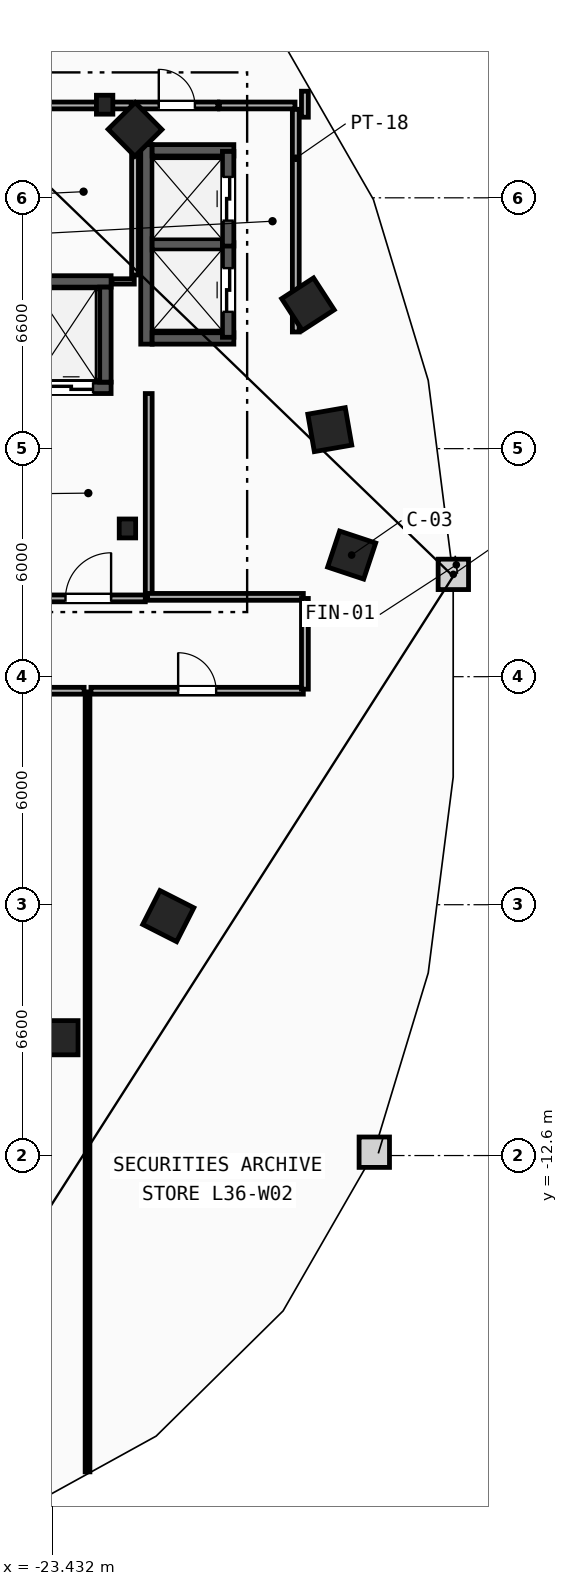
"""IFC4 building model, lengths in metres.
Left out: names, types, materials, properties, quantities, classifications, styles, units other than length and angle.
Written with IfcOpenShell. Run it as: python <this file> out.ifc"""

import sys

from ifc_helpers import new_model, si_unit, direction, frame, frame_2d, origin, origin_2d, place, context, subcontext, project, spatial, rectangle, i_section, extrude, element, fill, save


model = new_model("IFC4")
c1 = context("Model", 3, precision=1e-05, world=origin(), true_north=direction((0.0, 1.0)))
c2 = subcontext(c1, "Body", "Model", "MODEL_VIEW")
j1 = project(units=[si_unit("LENGTHUNIT", "METRE"), si_unit("PLANEANGLEUNIT", "RADIAN")], contexts=[c1])
p1 = place(None, origin())
s1 = spatial("IfcSite", under=j1, at=p1, CompositionType="ELEMENT")
p2 = place(p1, origin())
s2 = spatial("IfcBuilding", under=s1, at=p2, CompositionType="ELEMENT")
p3 = place(p2, frame((0.0, 0.0, 140.4)))
s3 = spatial("IfcBuildingStorey", under=s2, at=p3, CompositionType="ELEMENT", Elevation=140.4)
for number, where, z_axis, x_axis in (
    (1, (-21.45, 3.9, 0.0), (0.0, 0.0, 1.0), (1.0, 0.0, 0.0)),
    (2, (-22.05, 15.05, 0.0), (0.0, 0.0, 1.0), (1.0, 0.0, 0.0)),
):
    element("IfcColumn", number, at=place(p3, frame(where, z_axis=z_axis, x_axis=x_axis)), inside=s3, PredefinedType="COLUMN", context=c2, shape_type="SweptSolid", body=[
        extrude(i_section(OverallWidth=0.432, OverallDepth=0.498, WebThickness=0.056, FlangeThickness=0.089, FilletRadius=0.018, at=origin_2d()), origin(), (0.0, 0.0, 1.0), 3.6),
    ])
p4 = place(p3, frame((-23.2, -9.5, 0.0), z_axis=(0.0, 0.0, 1.0), x_axis=(1.0, 0.0, 0.0)))
e3 = element("IfcColumn", 3, at=p4, inside=s3, PredefinedType="COLUMN", context=c2, shape_type="SweptSolid", body=[
    extrude(rectangle(XDim=0.9, YDim=0.9, at=origin_2d()), origin(), (0.0, 0.0, 1.0), 3.6),
])
for number, where, z_axis, x_axis in (
    (4, (-15.55, 3.2, 0.0), (0.0, 0.0, 1.0), (0.315, 0.949, 0.0)),
    (5, (-16.125, 6.5, 0.0), (0.0, 0.0, 1.0), (-0.172, 0.985, 0.0)),
    (6, (-16.7, 9.8, 0.0), (0.0, 0.0, 1.0), (-0.544, 0.839, 0.0)),
    (7, (-21.25, 14.4, 0.0), (0.0, 0.0, 1.0), (-0.703, 0.711, 0.0)),
    (8, (-20.375, -6.3, 0.0), (0.0, 0.0, 1.0), (0.453, 0.892, 0.0)),
):
    element("IfcColumn", number, at=place(p3, frame(where, z_axis=z_axis, x_axis=x_axis)), inside=s3, PredefinedType="COLUMN", context=c2, shape_type="SweptSolid", body=[
        extrude(rectangle(XDim=1.0, YDim=1.0, at=origin_2d()), origin(), (0.0, 0.0, 1.0), 3.6),
    ])
p5 = place(p3, frame((-20.89, 2.15, 0.0), z_axis=(0.0, 0.0, 1.0), x_axis=(0.0, 1.0, 0.0)))
e9 = element("IfcWall", 9, at=p5, inside=s3, PredefinedType="PARTITIONING", context=c2, shape_type="SweptSolid", body=[
    extrude(rectangle(XDim=5.3, YDim=0.18, at=frame_2d((2.65, 0.0))), origin(), (0.0, 0.0, 1.0), 3.36),
])
p6 = place(p3, frame((-23.98, 2.06, 0.0), z_axis=(0.0, 0.0, 1.0), x_axis=(1.0, 0.0, 0.0)))
e10 = element("IfcWall", 10, at=p6, inside=s3, PredefinedType="PARTITIONING", context=c2, shape_type="SweptSolid", body=[
    extrude(rectangle(XDim=3.0, YDim=0.18, at=frame_2d((1.5, 0.0))), origin(), (0.0, 0.0, 1.0), 3.36),
])
p7 = place(p6, frame((0.9, 0.0, 0.0)))
e11 = element("IfcOpeningElement", 11, at=p7, cuts=e10, PredefinedType="OPENING", context=c2, shape_type="SweptSolid", body=[
    extrude(rectangle(XDim=1.2, YDim=2.15, at=frame_2d((0.6, 1.075))), frame((0.0, 0.1, 0.0), z_axis=(0.0, -1.0, 0.0), x_axis=(1.0, 0.0, 0.0)), (0.0, 0.0, 1.0), 0.2),
])
p8 = place(p3, frame((-23.98, 7.6, 0.0), z_axis=(0.0, 0.0, 1.0), x_axis=(1.0, 0.0, 0.0)))
e12 = element("IfcWall", 12, at=p8, inside=s3, PredefinedType="SHEAR", context=c2, shape_type="SweptSolid", body=[
    extrude(rectangle(XDim=2.1, YDim=0.3, at=frame_2d((1.05, 0.0))), origin(), (0.0, 0.0, 1.0), 3.36),
])
p9 = place(p8, frame((0.475, 0.0, 0.0)))
e13 = element("IfcOpeningElement", 13, at=p9, cuts=e12, PredefinedType="OPENING", context=c2, shape_type="SweptSolid", body=[
    extrude(rectangle(XDim=1.15, YDim=2.2, at=frame_2d((0.575, 1.1))), frame((0.0, 0.16, 0.0), z_axis=(0.0, -1.0, 0.0), x_axis=(1.0, 0.0, 0.0)), (0.0, 0.0, 1.0), 0.32),
])
p10 = place(p3, frame((-23.98, 10.4, 0.0), z_axis=(0.0, 0.0, 1.0), x_axis=(1.0, 0.0, 0.0)))
e14 = element("IfcWall", 14, at=p10, inside=s3, PredefinedType="SHEAR", context=c2, shape_type="SweptSolid", body=[
    extrude(rectangle(XDim=2.1, YDim=0.3, at=frame_2d((1.05, 0.0))), origin(), (0.0, 0.0, 1.0), 3.36),
])
p11 = place(p3, frame((-22.03, 7.75, 0.0), z_axis=(0.0, 0.0, 1.0), x_axis=(0.0, 1.0, 0.0)))
e15 = element("IfcWall", 15, at=p11, inside=s3, PredefinedType="SHEAR", context=c2, shape_type="SweptSolid", body=[
    extrude(rectangle(XDim=2.5, YDim=0.3, at=frame_2d((1.25, 0.0))), origin(), (0.0, 0.0, 1.0), 3.36),
])
p12 = place(p3, frame((-20.95, 8.75, 0.0), z_axis=(0.0, 0.0, 1.0), x_axis=(0.0, 1.0, 0.0)))
e16 = element("IfcWall", 16, at=p12, inside=s3, PredefinedType="SHEAR", context=c2, shape_type="SweptSolid", body=[
    extrude(rectangle(XDim=5.25, YDim=0.3, at=frame_2d((2.625, 0.0))), origin(), (0.0, 0.0, 1.0), 3.36),
])
for number, where, z_axis, x_axis in (
    (17, (-20.8, 8.9, 0.0), (0.0, 0.0, 1.0), (1.0, 0.0, 0.0)),
    (18, (-20.8, 13.85, 0.0), (0.0, 0.0, 1.0), (1.0, 0.0, 0.0)),
):
    element("IfcWall", number, at=place(p3, frame(where, z_axis=z_axis, x_axis=x_axis)), inside=s3, PredefinedType="SHEAR", context=c2, shape_type="SweptSolid", body=[
        extrude(rectangle(XDim=2.15, YDim=0.3, at=frame_2d((1.075, 0.0))), origin(), (0.0, 0.0, 1.0), 3.36),
    ])
p13 = place(p3, frame((-20.8, 11.375, 0.0), z_axis=(0.0, 0.0, 1.0), x_axis=(1.0, 0.0, 0.0)))
e19 = element("IfcWall", 19, at=p13, inside=s3, PredefinedType="SHEAR", context=c2, shape_type="SweptSolid", body=[
    extrude(rectangle(XDim=1.85, YDim=0.3, at=frame_2d((0.925, 0.0))), origin(), (0.0, 0.0, 1.0), 3.36),
])
p14 = place(p3, frame((-18.8, 8.93, 0.0), z_axis=(0.0, 0.0, 1.0), x_axis=(0.0, 1.0, 0.0)))
e20 = element("IfcWall", 20, at=p14, inside=s3, PredefinedType="SHEAR", context=c2, shape_type="SweptSolid", body=[
    extrude(rectangle(XDim=2.49, YDim=0.3, at=frame_2d((1.245, 0.0))), origin(), (0.0, 0.0, 1.0), 3.36),
])
p15 = place(p14, frame((0.67, 0.0, 0.0)))
e21 = element("IfcOpeningElement", 21, at=p15, cuts=e20, PredefinedType="OPENING", context=c2, shape_type="SweptSolid", body=[
    extrude(rectangle(XDim=1.15, YDim=2.2, at=frame_2d((0.575, 1.1))), frame((0.0, 0.16, 0.0), z_axis=(0.0, -1.0, 0.0), x_axis=(1.0, 0.0, 0.0)), (0.0, 0.0, 1.0), 0.32),
])
p16 = place(p3, frame((-18.8, 11.33, 0.0), z_axis=(0.0, 0.0, 1.0), x_axis=(0.0, 1.0, 0.0)))
e22 = element("IfcWall", 22, at=p16, inside=s3, PredefinedType="SHEAR", context=c2, shape_type="SweptSolid", body=[
    extrude(rectangle(XDim=2.49, YDim=0.3, at=frame_2d((1.245, 0.0))), origin(), (0.0, 0.0, 1.0), 3.36),
])
p17 = place(p16, frame((0.67, 0.0, 0.0)))
e23 = element("IfcOpeningElement", 23, at=p17, cuts=e22, PredefinedType="OPENING", context=c2, shape_type="SweptSolid", body=[
    extrude(rectangle(XDim=1.15, YDim=2.2, at=frame_2d((0.575, 1.1))), frame((0.0, 0.16, 0.0), z_axis=(0.0, -1.0, 0.0), x_axis=(1.0, 0.0, 0.0)), (0.0, 0.0, 1.0), 0.32),
])
p18 = place(p3, frame((-17.02, 9.07, 0.0), z_axis=(0.0, 0.0, 1.0), x_axis=(0.0, 1.0, 0.0)))
e24 = element("IfcWall", 24, at=p18, inside=s3, PredefinedType="PARTITIONING", context=c2, shape_type="SweptSolid", body=[
    extrude(rectangle(XDim=5.86, YDim=0.18, at=frame_2d((2.93, 0.0))), origin(), (0.0, 0.0, 1.0), 3.36),
])
p19 = place(p3, frame((-21.23, 15.03, 0.0), z_axis=(0.0, 0.0, 1.0), x_axis=(1.0, 0.0, 0.0)))
e25 = element("IfcWall", 25, at=p19, inside=s3, PredefinedType="PARTITIONING", context=c2, shape_type="SweptSolid", body=[
    extrude(rectangle(XDim=2.16, YDim=0.18, at=frame_2d((1.08, 0.0))), origin(), (0.0, 0.0, 1.0), 3.36),
])
p20 = place(p19, frame((0.605, 0.0, 0.0)))
e26 = element("IfcOpeningElement", 26, at=p20, cuts=e25, PredefinedType="OPENING", context=c2, shape_type="SweptSolid", body=[
    extrude(rectangle(XDim=0.95, YDim=2.1, at=frame_2d((0.475, 1.05))), frame((0.0, 0.1, 0.0), z_axis=(0.0, -1.0, 0.0), x_axis=(1.0, 0.0, 0.0)), (0.0, 0.0, 1.0), 0.2),
])
p21 = place(p3, frame((-19.03, 15.03, 0.0), z_axis=(0.0, 0.0, 1.0), x_axis=(1.0, 0.0, 0.0)))
e27 = element("IfcWall", 27, at=p21, inside=s3, PredefinedType="PARTITIONING", context=c2, shape_type="SweptSolid", body=[
    extrude(rectangle(XDim=1.99, YDim=0.18, at=frame_2d((0.995, 0.0))), origin(), (0.0, 0.0, 1.0), 3.36),
])
p22 = place(p3, frame((-21.86, 10.4, 0.0), z_axis=(0.0, 0.0, 1.0), x_axis=(1.0, 0.0, 0.0)))
e28 = element("IfcWall", 28, at=p22, inside=s3, PredefinedType="PARTITIONING", context=c2, shape_type="SweptSolid", body=[
    extrude(rectangle(XDim=0.59, YDim=0.14, at=frame_2d((0.295, 0.0))), origin(), (0.0, 0.0, 1.0), 3.36),
])
p23 = place(p3, frame((-21.25, 10.57, 0.0), z_axis=(0.0, 0.0, 1.0), x_axis=(0.0, 1.0, 0.0)))
e29 = element("IfcWall", 29, at=p23, inside=s3, PredefinedType="PARTITIONING", context=c2, shape_type="SweptSolid", body=[
    extrude(rectangle(XDim=4.36, YDim=0.18, at=frame_2d((2.18, 0.0))), origin(), (0.0, 0.0, 1.0), 3.36),
])
p24 = place(p3, frame((-23.96, 15.03, 0.0), z_axis=(0.0, 0.0, 1.0), x_axis=(1.0, 0.0, 0.0)))
e30 = element("IfcWall", 30, at=p24, inside=s3, PredefinedType="PARTITIONING", context=c2, shape_type="SweptSolid", body=[
    extrude(rectangle(XDim=2.61, YDim=0.18, at=frame_2d((1.305, 0.0))), origin(), (0.0, 0.0, 1.0), 2.433),
])
p25 = place(p3, frame((-22.5, -20.923, 0.0), z_axis=(0.0, 0.0, 1.0), x_axis=(0.0, 1.0, 0.0)))
e31 = element("IfcWall", 31, at=p25, inside=s3, PredefinedType="PARTITIONING", context=c2, shape_type="SweptSolid", body=[
    extrude(rectangle(XDim=20.523, YDim=0.125, at=frame_2d((10.262, 0.0))), origin(), (0.0, 0.0, 1.0), 2.665),
])
p26 = place(p3, frame((-25.4, -0.37, 0.0), z_axis=(0.0, 0.0, 1.0), x_axis=(1.0, 0.0, 0.0)))
e32 = element("IfcWall", 32, at=p26, inside=s3, PredefinedType="PARTITIONING", context=c2, shape_type="SweptSolid", body=[
    extrude(rectangle(XDim=2.81, YDim=0.18, at=frame_2d((1.405, 0.0))), origin(), (0.0, 0.0, 1.0), 3.36),
])
p27 = place(p3, frame((-22.41, -0.37, 0.0), z_axis=(0.0, 0.0, 1.0), x_axis=(1.0, 0.0, 0.0)))
e33 = element("IfcWall", 33, at=p27, inside=s3, PredefinedType="PARTITIONING", context=c2, shape_type="SweptSolid", body=[
    extrude(rectangle(XDim=5.588, YDim=0.18, at=frame_2d((2.794, 0.0))), origin(), (0.0, 0.0, 1.0), 3.36),
])
p28 = place(p27, frame((2.294, 0.0, 0.0)))
e34 = element("IfcOpeningElement", 34, at=p28, cuts=e33, PredefinedType="OPENING", context=c2, shape_type="SweptSolid", body=[
    extrude(rectangle(XDim=1.0, YDim=2.15, at=frame_2d((0.5, 1.075))), frame((0.0, 0.1, 0.0), z_axis=(0.0, -1.0, 0.0), x_axis=(1.0, 0.0, 0.0)), (0.0, 0.0, 1.0), 0.2),
])
p29 = place(p3, frame((-16.822, 2.1, 0.0), z_axis=(0.0, 0.0, 1.0), x_axis=(-1.0, 0.0, 0.0)))
e35 = element("IfcWall", 35, at=p29, inside=s3, PredefinedType="PARTITIONING", context=c2, shape_type="SweptSolid", body=[
    extrude(rectangle(XDim=4.098, YDim=0.18, at=frame_2d((2.049, 0.0))), origin(), (0.0, 0.0, 1.0), 3.36),
])
p30 = place(p3, frame((-16.78, -0.329, 0.0), z_axis=(0.0, 0.0, 1.0), x_axis=(0.0, 1.0, 0.0)))
e36 = element("IfcWall", 36, at=p30, inside=s3, PredefinedType="PARTITIONING", context=c2, shape_type="SweptSolid", body=[
    extrude(rectangle(XDim=2.387, YDim=0.18, at=frame_2d((1.194, 0.0))), origin(), (0.0, 0.0, 1.0), 3.36),
])
p31 = place(p3, frame((-16.78, 14.721, 0.0), z_axis=(0.0, 0.0, 1.0), x_axis=(0.0, 1.0, 0.0)))
e37 = element("IfcWall", 37, at=p31, inside=s3, PredefinedType="PARTITIONING", context=c2, shape_type="SweptSolid", body=[
    extrude(rectangle(XDim=0.684, YDim=0.18, at=frame_2d((0.342, 0.0))), origin(), (0.0, 0.0, 1.0), 3.36),
])
p32 = place(p7, origin())
e38 = element("IfcDoor", 38, at=p32, inside=s3, OperationType="SINGLE_SWING_RIGHT", PredefinedType="DOOR", context=c2, shape_type="SweptSolid", body=[
    extrude(rectangle(XDim=1.2, YDim=2.15, at=frame_2d((0.6, 1.075))), frame((0.0, 0.025, 0.0), z_axis=(0.0, -1.0, 0.0), x_axis=(1.0, 0.0, 0.0)), (0.0, 0.0, 1.0), 0.05),
])
fill(e11, e38)
p33 = place(p9, origin())
e39 = element("IfcDoor", 39, at=p33, inside=s3, OperationType="SLIDING_TO_LEFT", PredefinedType="TRAPDOOR", context=c2, shape_type="SweptSolid", body=[
    extrude(rectangle(XDim=1.15, YDim=2.2, at=frame_2d((0.575, 1.1))), frame((0.0, 0.025, 0.0), z_axis=(0.0, -1.0, 0.0), x_axis=(1.0, 0.0, 0.0)), (0.0, 0.0, 1.0), 0.05),
])
fill(e13, e39)
p34 = place(p15, origin())
e40 = element("IfcDoor", 40, at=p34, inside=s3, OperationType="SLIDING_TO_LEFT", PredefinedType="TRAPDOOR", context=c2, shape_type="SweptSolid", body=[
    extrude(rectangle(XDim=1.15, YDim=2.2, at=frame_2d((0.575, 1.1))), frame((0.0, 0.025, 0.0), z_axis=(0.0, -1.0, 0.0), x_axis=(1.0, 0.0, 0.0)), (0.0, 0.0, 1.0), 0.05),
])
fill(e21, e40)
p35 = place(p17, origin())
e41 = element("IfcDoor", 41, at=p35, inside=s3, OperationType="SLIDING_TO_LEFT", PredefinedType="TRAPDOOR", context=c2, shape_type="SweptSolid", body=[
    extrude(rectangle(XDim=1.15, YDim=2.2, at=frame_2d((0.575, 1.1))), frame((0.0, 0.025, 0.0), z_axis=(0.0, -1.0, 0.0), x_axis=(1.0, 0.0, 0.0)), (0.0, 0.0, 1.0), 0.05),
])
fill(e23, e41)
p36 = place(p28, origin())
e42 = element("IfcDoor", 42, at=p36, inside=s3, OperationType="SINGLE_SWING_LEFT", PredefinedType="DOOR", context=c2, shape_type="SweptSolid", body=[
    extrude(rectangle(XDim=1.0, YDim=2.15, at=frame_2d((0.5, 1.075))), frame((0.0, 0.025, 0.0), z_axis=(0.0, -1.0, 0.0), x_axis=(1.0, 0.0, 0.0)), (0.0, 0.0, 1.0), 0.05),
])
fill(e34, e42)
p37 = place(p20, origin())
e43 = element("IfcDoor", 43, at=p37, inside=s3, OperationType="SINGLE_SWING_LEFT", PredefinedType="DOOR", context=c2, shape_type="SweptSolid", body=[
    extrude(rectangle(XDim=0.95, YDim=2.1, at=frame_2d((0.475, 1.05))), frame((0.0, 0.025, 0.0), z_axis=(0.0, -1.0, 0.0), x_axis=(1.0, 0.0, 0.0)), (0.0, 0.0, 1.0), 0.05),
])
fill(e26, e43)
save(model, sys.argv[1])
